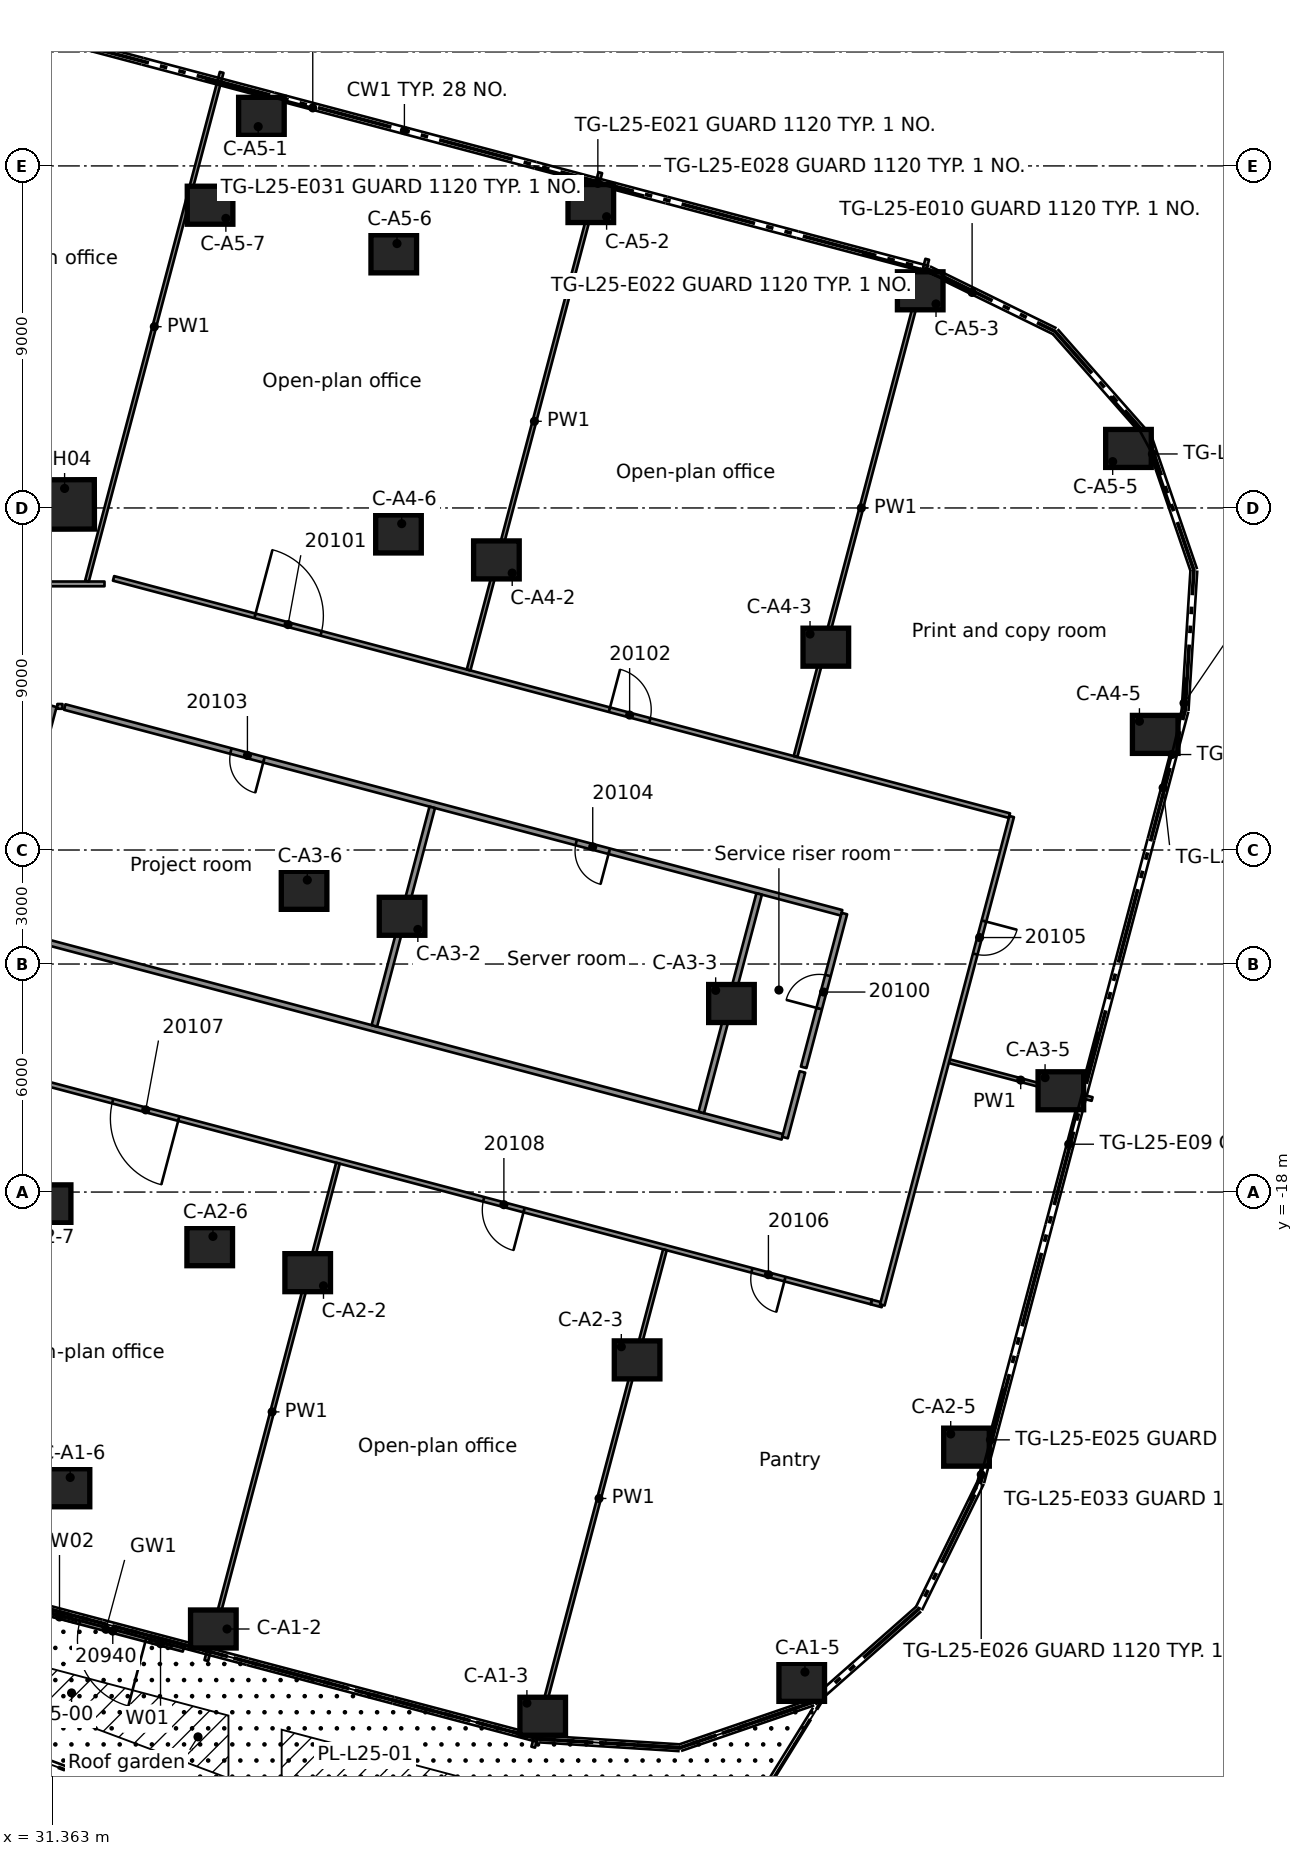
"""IFC4 building model, lengths in metres.
Left out: names, types, materials, properties, quantities, classifications, styles, units other than length and angle.
Written with IfcOpenShell. Run it as: python <this file> out.ifc"""

import sys

from ifc_helpers import new_model, si_unit, direction, frame, frame_2d, origin, origin_2d, place, context, subcontext, project, spatial, rectangle, extrude, element, fill, save


model = new_model("IFC4")
c1 = context("Model", 3, precision=1e-05, world=origin(), true_north=direction((0.0, 1.0)))
c2 = subcontext(c1, "Body", "Model", "MODEL_VIEW")
j1 = project(units=[si_unit("LENGTHUNIT", "METRE"), si_unit("PLANEANGLEUNIT", "RADIAN")], contexts=[c1])
p1 = place(None, origin())
s1 = spatial("IfcSite", under=j1, at=p1, CompositionType="ELEMENT")
p2 = place(p1, origin())
s2 = spatial("IfcBuilding", under=s1, at=p2, CompositionType="ELEMENT")
p3 = place(p2, frame((0.0, 0.0, 102.2)))
s3 = spatial("IfcBuildingStorey", under=s2, at=p3, CompositionType="ELEMENT", Elevation=102.2)
for number, where, z_axis, x_axis in (
    (1, (35.602, -29.497, 0.0), (0.0, 0.0, 1.0), (1.0, 0.0, 0.0)),
    (2, (44.269, -31.793, 0.0), (0.0, 0.0, 1.0), (1.0, 0.0, 0.0)),
    (3, (51.085, -30.901, 0.0), (0.0, 0.0, 1.0), (1.0, 0.0, 0.0)),
    (4, (31.751, -25.781, 0.0), (0.0, 0.0, 1.0), (1.0, 0.0, 0.0)),
    (5, (38.085, -20.121, 0.0), (0.0, 0.0, 1.0), (1.0, 0.0, 0.0)),
    (6, (46.753, -22.416, 0.0), (0.0, 0.0, 1.0), (1.0, 0.0, 0.0)),
    (7, (55.421, -24.712, 0.0), (0.0, 0.0, 1.0), (1.0, 0.0, 0.0)),
    (8, (35.507, -19.438, 0.0), (0.0, 0.0, 1.0), (1.0, 0.0, 0.0)),
    (9, (31.254, -18.311, 0.0), (0.0, 0.0, 1.0), (1.0, 0.0, 0.0)),
    (10, (40.568, -10.744, 0.0), (0.0, 0.0, 1.0), (1.0, 0.0, 0.0)),
    (11, (49.236, -13.039, 0.0), (0.0, 0.0, 1.0), (1.0, 0.0, 0.0)),
    (12, (57.904, -15.335, 0.0), (0.0, 0.0, 1.0), (1.0, 0.0, 0.0)),
    (13, (37.99, -10.061, 0.0), (0.0, 0.0, 1.0), (1.0, 0.0, 0.0)),
    (14, (43.051, -1.367, 0.0), (0.0, 0.0, 1.0), (1.0, 0.0, 0.0)),
    (15, (51.719, -3.663, 0.0), (0.0, 0.0, 1.0), (1.0, 0.0, 0.0)),
    (16, (60.387, -5.958, 0.0), (0.0, 0.0, 1.0), (1.0, 0.0, 0.0)),
    (17, (40.474, -0.684, 0.0), (0.0, 0.0, 1.0), (1.0, 0.0, 0.0)),
    (18, (36.867, 10.305, 0.0), (0.0, 0.0, 1.0), (1.0, 0.0, 0.0)),
    (19, (45.535, 8.01, 0.0), (0.0, 0.0, 1.0), (1.0, 0.0, 0.0)),
    (20, (54.203, 5.714, 0.0), (0.0, 0.0, 1.0), (1.0, 0.0, 0.0)),
    (21, (59.683, 1.566, 0.0), (0.0, 0.0, 1.0), (1.0, 0.0, 0.0)),
    (22, (40.35, 6.686, 0.0), (0.0, 0.0, 1.0), (1.0, 0.0, 0.0)),
    (23, (35.516, 7.966, 0.0), (0.0, 0.0, 1.0), (1.0, 0.0, 0.0)),
):
    element("IfcColumn", number, at=place(p3, frame(where, z_axis=z_axis, x_axis=x_axis)), inside=s3, PredefinedType="COLUMN", context=c2, shape_type="SweptSolid", body=[
        extrude(rectangle(XDim=1.2, YDim=1.0, at=origin_2d()), origin(), (0.0, 0.0, 1.0), 3.5),
    ])
p4 = place(p3, frame((31.822, 0.093, 0.0), z_axis=(0.0, 0.0, 1.0), x_axis=(0.999995752265, 0.002914695724, 0.0)))
e24 = element("IfcColumn", 24, at=p4, inside=s3, PredefinedType="COLUMN", context=c2, shape_type="SweptSolid", body=[
    extrude(rectangle(XDim=1.3, YDim=1.3, at=origin_2d()), origin(), (0.0, 0.0, 1.0), 3.5),
])
p5 = place(p3, frame((34.811, -30.043, 0.0), z_axis=(0.0, 0.0, 1.0), x_axis=(-0.966670614425, 0.256023286456, 0.0)))
e25 = element("IfcWall", 25, at=p5, inside=s3, PredefinedType="STANDARD", context=c2, shape_type="SweptSolid", body=[
    extrude(rectangle(XDim=4.209, YDim=0.1, at=frame_2d((2.104, 0.0))), origin(), (0.0, 0.0, 1.0), 3.1),
])
p6 = place(p5, frame((1.019, 0.0, 0.0)))
e26 = element("IfcOpeningElement", 26, at=p6, cuts=e25, PredefinedType="OPENING", context=c2, shape_type="SweptSolid", body=[
    extrude(rectangle(XDim=1.8, YDim=2.4, at=frame_2d((0.9, 1.2))), frame((0.0, 0.06, 0.0), z_axis=(0.0, -1.0, 0.0), x_axis=(1.0, 0.0, 0.0)), (0.0, 0.0, 1.0), 0.12),
])
p7 = place(p5, frame((0.319, 0.0, 0.0)))
e27 = element("IfcOpeningElement", 27, at=p7, cuts=e25, PredefinedType="OPENING", context=c2, shape_type="SweptSolid", body=[
    extrude(rectangle(XDim=0.6, YDim=2.4, at=frame_2d((0.3, 1.2))), frame((0.0, 0.06, 0.0), z_axis=(0.0, -1.0, 0.0), x_axis=(1.0, 0.0, 0.0)), (0.0, 0.0, 1.0), 0.12),
])
p8 = place(p5, frame((2.919, 0.0, 0.0)))
e28 = element("IfcOpeningElement", 28, at=p8, cuts=e25, PredefinedType="OPENING", context=c2, shape_type="SweptSolid", body=[
    extrude(rectangle(XDim=0.9, YDim=2.4, at=frame_2d((0.45, 1.2))), frame((0.0, 0.06, 0.0), z_axis=(0.0, -1.0, 0.0), x_axis=(1.0, 0.0, 0.0)), (0.0, 0.0, 1.0), 0.12),
])
p9 = place(p3, frame((52.915, -20.893, 0.0), z_axis=(0.0, 0.0, 1.0), x_axis=(0.966598588757, -0.256295080352, 0.0)))
e29 = element("IfcWall", 29, at=p9, inside=s3, PredefinedType="PARTITIONING", context=c2, shape_type="SweptSolid", body=[
    extrude(rectangle(XDim=0.3, YDim=0.125, at=frame_2d((0.15, 0.0))), origin(), (0.0, 0.0, 1.0), 3.08),
])
p10 = place(p3, frame((52.916, -20.892, 0.0), z_axis=(0.0, 0.0, 1.0), x_axis=(-0.966698340064, 0.255918579469, 0.0)))
e30 = element("IfcWall", 30, at=p10, inside=s3, PredefinedType="PARTITIONING", context=c2, shape_type="SweptSolid", body=[
    extrude(rectangle(XDim=24.759, YDim=0.125, at=frame_2d((12.379, 0.0))), origin(), (0.0, 0.0, 1.0), 3.08),
])
p11 = place(p10, frame((2.351, 0.0, 0.0)))
e31 = element("IfcOpeningElement", 31, at=p11, cuts=e30, PredefinedType="OPENING", context=c2, shape_type="SweptSolid", body=[
    extrude(rectangle(XDim=0.9, YDim=2.1, at=frame_2d((0.45, 1.05))), frame((0.0, 0.073, 0.0), z_axis=(0.0, -1.0, 0.0), x_axis=(1.0, 0.0, 0.0)), (0.0, 0.0, 1.0), 0.145),
])
p12 = place(p10, frame((18.851, 0.0, 0.0)))
e32 = element("IfcOpeningElement", 32, at=p12, cuts=e30, PredefinedType="OPENING", context=c2, shape_type="SweptSolid", body=[
    extrude(rectangle(XDim=1.8, YDim=2.1, at=frame_2d((0.9, 1.05))), frame((0.0, 0.073, 0.0), z_axis=(0.0, -1.0, 0.0), x_axis=(1.0, 0.0, 0.0)), (0.0, 0.0, 1.0), 0.145),
])
p13 = place(p10, frame((9.451, 0.0, 0.0)))
e33 = element("IfcOpeningElement", 33, at=p13, cuts=e30, PredefinedType="OPENING", context=c2, shape_type="SweptSolid", body=[
    extrude(rectangle(XDim=1.1, YDim=2.1, at=frame_2d((0.55, 1.05))), frame((0.0, 0.073, 0.0), z_axis=(0.0, -1.0, 0.0), x_axis=(1.0, 0.0, 0.0)), (0.0, 0.0, 1.0), 0.145),
])
p14 = place(p3, frame((30.016, -11.104, 0.0), z_axis=(0.0, 0.0, 1.0), x_axis=(0.966689773776, -0.255950935293, 0.0)))
e34 = element("IfcWall", 34, at=p14, inside=s3, PredefinedType="PARTITIONING", context=c2, shape_type="SweptSolid", body=[
    extrude(rectangle(XDim=21.266, YDim=0.15, at=frame_2d((10.633, 0.0))), origin(), (0.0, 0.0, 1.0), 3.08),
])
p15 = place(p3, frame((54.968, -14.557, 0.0), z_axis=(0.0, 0.0, 1.0), x_axis=(0.966683749524, -0.25597368694, 0.0)))
e35 = element("IfcWall", 35, at=p15, inside=s3, PredefinedType="PARTITIONING", context=c2, shape_type="SweptSolid", body=[
    extrude(rectangle(XDim=3.888, YDim=0.1, at=frame_2d((1.944, 0.0))), origin(), (0.0, 0.0, 1.0), 3.08),
])
p16 = place(p3, frame((52.134, -10.652, 0.0), z_axis=(0.0, 0.0, 1.0), x_axis=(-0.966671200414, 0.25602107392, 0.0)))
e36 = element("IfcWall", 36, at=p16, inside=s3, PredefinedType="PARTITIONING", context=c2, shape_type="SweptSolid", body=[
    extrude(rectangle(XDim=21.147, YDim=0.15, at=frame_2d((10.573, 0.0))), origin(), (0.0, 0.0, 1.0), 3.08),
])
p17 = place(p16, frame((15.724, 0.0, 0.0)))
e37 = element("IfcOpeningElement", 37, at=p17, cuts=e36, PredefinedType="OPENING", context=c2, shape_type="SweptSolid", body=[
    extrude(rectangle(XDim=0.9, YDim=2.1, at=frame_2d((0.45, 1.05))), frame((0.0, 0.085, 0.0), z_axis=(0.0, -1.0, 0.0), x_axis=(1.0, 0.0, 0.0)), (0.0, 0.0, 1.0), 0.17),
])
p18 = place(p16, frame((6.324, 0.0, 0.0)))
e38 = element("IfcOpeningElement", 38, at=p18, cuts=e36, PredefinedType="OPENING", context=c2, shape_type="SweptSolid", body=[
    extrude(rectangle(XDim=0.9, YDim=2.1, at=frame_2d((0.45, 1.05))), frame((0.0, 0.085, 0.0), z_axis=(0.0, -1.0, 0.0), x_axis=(1.0, 0.0, 0.0)), (0.0, 0.0, 1.0), 0.17),
])
p19 = place(p3, frame((32.976, -1.853, 0.0), z_axis=(0.0, 0.0, 1.0), x_axis=(0.966679949131, -0.255988038682, 0.0)))
e39 = element("IfcWall", 39, at=p19, inside=s3, PredefinedType="PARTITIONING", context=c2, shape_type="SweptSolid", body=[
    extrude(rectangle(XDim=24.387, YDim=0.125, at=frame_2d((12.194, 0.0))), origin(), (0.0, 0.0, 1.0), 3.08),
])
p20 = place(p19, frame((3.85, 0.0, 0.0)))
e40 = element("IfcOpeningElement", 40, at=p20, cuts=e39, PredefinedType="OPENING", context=c2, shape_type="SweptSolid", body=[
    extrude(rectangle(XDim=1.8, YDim=2.1, at=frame_2d((0.9, 1.05))), frame((0.0, 0.073, 0.0), z_axis=(0.0, -1.0, 0.0), x_axis=(1.0, 0.0, 0.0)), (0.0, 0.0, 1.0), 0.145),
])
p21 = place(p19, frame((13.499, 0.0, 0.0)))
e41 = element("IfcOpeningElement", 41, at=p21, cuts=e39, PredefinedType="OPENING", context=c2, shape_type="SweptSolid", body=[
    extrude(rectangle(XDim=1.1, YDim=2.1, at=frame_2d((0.55, 1.05))), frame((0.0, 0.073, 0.0), z_axis=(0.0, -1.0, 0.0), x_axis=(1.0, 0.0, 0.0)), (0.0, 0.0, 1.0), 0.145),
])
p22 = place(p3, frame((31.497, -5.22, 0.0), z_axis=(0.0, 0.0, 1.0), x_axis=(0.999895375943, -0.014465032563, 0.0)))
e42 = element("IfcWall", 42, at=p22, inside=s3, PredefinedType="PARTITIONING", context=c2, shape_type="SweptSolid", body=[
    extrude(rectangle(XDim=0.135, YDim=0.125, at=frame_2d((0.067, 0.0))), origin(), (0.0, 0.0, 1.0), 3.08),
])
p23 = place(p3, frame((30.819, -1.998, 0.0), z_axis=(0.0, 0.0, 1.0), x_axis=(1.0, 0.0, 0.0)))
e43 = element("IfcWall", 43, at=p23, inside=s3, PredefinedType="PARTITIONING", context=c2, shape_type="SweptSolid", body=[
    extrude(rectangle(XDim=1.919, YDim=0.125, at=frame_2d((0.959, 0.0))), origin(), (0.0, 0.0, 1.0), 3.08),
])
p24 = place(p3, frame((56.609, -8.119, 0.0), z_axis=(0.0, 0.0, 1.0), x_axis=(-0.256036919422, -0.966667003623, 0.0)))
e44 = element("IfcWall", 44, at=p24, inside=s3, PredefinedType="PARTITIONING", context=c2, shape_type="SweptSolid", body=[
    extrude(rectangle(XDim=13.294, YDim=0.125, at=frame_2d((6.647, 0.0))), origin(), (0.0, 0.0, 1.0), 3.08),
])
p25 = place(p24, frame((2.844, 0.0, 0.0)))
e45 = element("IfcOpeningElement", 45, at=p25, cuts=e44, PredefinedType="OPENING", context=c2, shape_type="SweptSolid", body=[
    extrude(rectangle(XDim=0.9, YDim=2.1, at=frame_2d((0.45, 1.05))), frame((0.0, 0.073, 0.0), z_axis=(0.0, -1.0, 0.0), x_axis=(1.0, 0.0, 0.0)), (0.0, 0.0, 1.0), 0.145),
])
p26 = place(p3, frame((50.646, -16.567, 0.0), z_axis=(0.0, 0.0, 1.0), x_axis=(0.256234173413, 0.966614736271, 0.0)))
e46 = element("IfcWall", 46, at=p26, inside=s3, PredefinedType="PARTITIONING", context=c2, shape_type="SweptSolid", body=[
    extrude(rectangle(XDim=1.787, YDim=0.15, at=frame_2d((0.894, 0.0))), origin(), (0.0, 0.0, 1.0), 3.08),
])
p27 = place(p3, frame((51.136, -14.719, 0.0), z_axis=(0.0, 0.0, 1.0), x_axis=(0.25585088256, 0.966716259247, 0.0)))
e47 = element("IfcWall", 47, at=p27, inside=s3, PredefinedType="PARTITIONING", context=c2, shape_type="SweptSolid", body=[
    extrude(rectangle(XDim=4.186, YDim=0.15, at=frame_2d((2.093, 0.0))), origin(), (0.0, 0.0, 1.0), 3.08),
])
p28 = place(p27, frame((1.6, 0.0, 0.0)))
e48 = element("IfcOpeningElement", 48, at=p28, cuts=e47, PredefinedType="OPENING", context=c2, shape_type="SweptSolid", body=[
    extrude(rectangle(XDim=0.9, YDim=2.1, at=frame_2d((0.45, 1.05))), frame((0.0, 0.085, 0.0), z_axis=(0.0, -1.0, 0.0), x_axis=(1.0, 0.0, 0.0)), (0.0, 0.0, 1.0), 0.17),
])
p29 = place(p3, frame((44.019, -32.606, 0.0), z_axis=(0.0, 0.0, 1.0), x_axis=(0.25602242295, 0.966670843124, 0.0)))
e49 = element("IfcWall", 49, at=p29, inside=s3, PredefinedType="PARTITIONING", context=c2, shape_type="SweptSolid", body=[
    extrude(rectangle(XDim=13.538, YDim=0.1, at=frame_2d((6.769, 0.0))), origin(), (0.0, 0.0, 1.0), 3.08),
])
p30 = place(p3, frame((48.442, -15.905, 0.0), z_axis=(0.0, 0.0, 1.0), x_axis=(0.256111443265, 0.96664726174, 0.0)))
e50 = element("IfcWall", 50, at=p30, inside=s3, PredefinedType="PARTITIONING", context=c2, shape_type="SweptSolid", body=[
    extrude(rectangle(XDim=5.947, YDim=0.15, at=frame_2d((2.974, 0.0))), origin(), (0.0, 0.0, 1.0), 3.08),
])
p31 = place(p3, frame((50.922, -6.542, 0.0), z_axis=(0.0, 0.0, 1.0), x_axis=(0.25602342398, 0.966670578001, 0.0)))
e51 = element("IfcWall", 51, at=p31, inside=s3, PredefinedType="PARTITIONING", context=c2, shape_type="SweptSolid", body=[
    extrude(rectangle(XDim=13.537, YDim=0.1, at=frame_2d((6.769, 0.0))), origin(), (0.0, 0.0, 1.0), 3.08),
])
p32 = place(p3, frame((35.417, -30.328, 0.0), z_axis=(0.0, 0.0, 1.0), x_axis=(0.255955015068, 0.966688693562, 0.0)))
e52 = element("IfcWall", 52, at=p32, inside=s3, PredefinedType="PARTITIONING", context=c2, shape_type="SweptSolid", body=[
    extrude(rectangle(XDim=13.538, YDim=0.1, at=frame_2d((6.769, 0.0))), origin(), (0.0, 0.0, 1.0), 3.08),
])
p33 = place(p3, frame((39.839, -13.627, 0.0), z_axis=(0.0, 0.0, 1.0), x_axis=(0.256032445662, 0.966668188557, 0.0)))
e53 = element("IfcWall", 53, at=p33, inside=s3, PredefinedType="PARTITIONING", context=c2, shape_type="SweptSolid", body=[
    extrude(rectangle(XDim=5.948, YDim=0.15, at=frame_2d((2.974, 0.0))), origin(), (0.0, 0.0, 1.0), 3.08),
])
p34 = place(p3, frame((42.319, -4.263, 0.0), z_axis=(0.0, 0.0, 1.0), x_axis=(0.255956011123, 0.966688429832, 0.0)))
e54 = element("IfcWall", 54, at=p34, inside=s3, PredefinedType="PARTITIONING", context=c2, shape_type="SweptSolid", body=[
    extrude(rectangle(XDim=13.537, YDim=0.1, at=frame_2d((6.769, 0.0))), origin(), (0.0, 0.0, 1.0), 3.08),
])
p35 = place(p3, frame((29.858, -11.053, 0.0), z_axis=(0.0, 0.0, 1.0), x_axis=(0.256179404859, 0.966629252882, 0.0)))
e55 = element("IfcWall", 55, at=p35, inside=s3, PredefinedType="PARTITIONING", context=c2, shape_type="SweptSolid", body=[
    extrude(rectangle(XDim=6.035, YDim=0.15, at=frame_2d((3.018, 0.0))), origin(), (0.0, 0.0, 1.0), 3.08),
])
p36 = place(p3, frame((32.277, -1.923, 0.0), z_axis=(0.0, 0.0, 1.0), x_axis=(0.255967683611, 0.96668533916, 0.0)))
e56 = element("IfcWall", 56, at=p36, inside=s3, PredefinedType="PARTITIONING", context=c2, shape_type="SweptSolid", body=[
    extrude(rectangle(XDim=13.845, YDim=0.1, at=frame_2d((6.923, 0.0))), origin(), (0.0, 0.0, 1.0), 3.08),
])
p37 = place(p6, origin())
e57 = element("IfcDoor", 57, at=p37, inside=s3, OperationType="DOUBLE_DOOR_SINGLE_SWING", PredefinedType="DOOR", context=c2, shape_type="SweptSolid", body=[
    extrude(rectangle(XDim=1.8, YDim=2.4, at=frame_2d((0.9, 1.2))), frame((0.0, 0.025, 0.0), z_axis=(0.0, -1.0, 0.0), x_axis=(1.0, 0.0, 0.0)), (0.0, 0.0, 1.0), 0.05),
])
fill(e26, e57)
p38 = place(p7, origin())
e58 = element("IfcWindow", 58, at=p38, inside=s3, PartitioningType="SINGLE_PANEL", PredefinedType="WINDOW", context=c2, shape_type="SweptSolid", body=[
    extrude(rectangle(XDim=0.6, YDim=2.4, at=frame_2d((0.3, 1.2))), frame((0.0, 0.03, 0.0), z_axis=(0.0, -1.0, 0.0), x_axis=(1.0, 0.0, 0.0)), (0.0, 0.0, 1.0), 0.06),
])
fill(e27, e58)
p39 = place(p8, origin())
e59 = element("IfcWindow", 59, at=p39, inside=s3, PartitioningType="SINGLE_PANEL", PredefinedType="WINDOW", context=c2, shape_type="SweptSolid", body=[
    extrude(rectangle(XDim=0.9, YDim=2.4, at=frame_2d((0.45, 1.2))), frame((0.0, 0.03, 0.0), z_axis=(0.0, -1.0, 0.0), x_axis=(1.0, 0.0, 0.0)), (0.0, 0.0, 1.0), 0.06),
])
fill(e28, e59)
p40 = place(p28, origin())
e60 = element("IfcDoor", 60, at=p40, inside=s3, OperationType="SINGLE_SWING_LEFT", PredefinedType="DOOR", context=c2, shape_type="SweptSolid", body=[
    extrude(rectangle(XDim=0.9, YDim=2.1, at=frame_2d((0.45, 1.05))), frame((0.0, 0.025, 0.0), z_axis=(0.0, -1.0, 0.0), x_axis=(1.0, 0.0, 0.0)), (0.0, 0.0, 1.0), 0.05),
])
fill(e48, e60)
p41 = place(p20, origin())
e61 = element("IfcDoor", 61, at=p41, inside=s3, OperationType="DOUBLE_DOOR_SINGLE_SWING", PredefinedType="DOOR", context=c2, shape_type="SweptSolid", body=[
    extrude(rectangle(XDim=1.8, YDim=2.1, at=frame_2d((0.9, 1.05))), frame((0.0, 0.025, 0.0), z_axis=(0.0, -1.0, 0.0), x_axis=(1.0, 0.0, 0.0)), (0.0, 0.0, 1.0), 0.05),
])
fill(e40, e61)
p42 = place(p21, origin())
e62 = element("IfcDoor", 62, at=p42, inside=s3, OperationType="SINGLE_SWING_RIGHT", PredefinedType="DOOR", context=c2, shape_type="SweptSolid", body=[
    extrude(rectangle(XDim=1.1, YDim=2.1, at=frame_2d((0.55, 1.05))), frame((0.0, 0.025, 0.0), z_axis=(0.0, -1.0, 0.0), x_axis=(1.0, 0.0, 0.0)), (0.0, 0.0, 1.0), 0.05),
])
fill(e41, e62)
p43 = place(p17, origin())
e63 = element("IfcDoor", 63, at=p43, inside=s3, OperationType="SINGLE_SWING_RIGHT", PredefinedType="DOOR", context=c2, shape_type="SweptSolid", body=[
    extrude(rectangle(XDim=0.9, YDim=2.1, at=frame_2d((0.45, 1.05))), frame((0.0, 0.025, 0.0), z_axis=(0.0, -1.0, 0.0), x_axis=(1.0, 0.0, 0.0)), (0.0, 0.0, 1.0), 0.05),
])
fill(e37, e63)
p44 = place(p18, origin())
e64 = element("IfcDoor", 64, at=p44, inside=s3, OperationType="SINGLE_SWING_LEFT", PredefinedType="DOOR", context=c2, shape_type="SweptSolid", body=[
    extrude(rectangle(XDim=0.9, YDim=2.1, at=frame_2d((0.45, 1.05))), frame((0.0, 0.025, 0.0), z_axis=(0.0, -1.0, 0.0), x_axis=(1.0, 0.0, 0.0)), (0.0, 0.0, 1.0), 0.05),
])
fill(e38, e64)
p45 = place(p25, origin())
e65 = element("IfcDoor", 65, at=p45, inside=s3, OperationType="SINGLE_SWING_LEFT", PredefinedType="DOOR", context=c2, shape_type="SweptSolid", body=[
    extrude(rectangle(XDim=0.9, YDim=2.1, at=frame_2d((0.45, 1.05))), frame((0.0, 0.025, 0.0), z_axis=(0.0, -1.0, 0.0), x_axis=(1.0, 0.0, 0.0)), (0.0, 0.0, 1.0), 0.05),
])
fill(e45, e65)
p46 = place(p11, origin())
e66 = element("IfcDoor", 66, at=p46, inside=s3, OperationType="SINGLE_SWING_LEFT", PredefinedType="DOOR", context=c2, shape_type="SweptSolid", body=[
    extrude(rectangle(XDim=0.9, YDim=2.1, at=frame_2d((0.45, 1.05))), frame((0.0, 0.025, 0.0), z_axis=(0.0, -1.0, 0.0), x_axis=(1.0, 0.0, 0.0)), (0.0, 0.0, 1.0), 0.05),
])
fill(e31, e66)
p47 = place(p12, origin())
e67 = element("IfcDoor", 67, at=p47, inside=s3, OperationType="DOUBLE_DOOR_SINGLE_SWING", PredefinedType="DOOR", context=c2, shape_type="SweptSolid", body=[
    extrude(rectangle(XDim=1.8, YDim=2.1, at=frame_2d((0.9, 1.05))), frame((0.0, 0.025, 0.0), z_axis=(0.0, -1.0, 0.0), x_axis=(1.0, 0.0, 0.0)), (0.0, 0.0, 1.0), 0.05),
])
fill(e32, e67)
p48 = place(p13, origin())
e68 = element("IfcDoor", 68, at=p48, inside=s3, OperationType="SINGLE_SWING_LEFT", PredefinedType="DOOR", context=c2, shape_type="SweptSolid", body=[
    extrude(rectangle(XDim=1.1, YDim=2.1, at=frame_2d((0.55, 1.05))), frame((0.0, 0.025, 0.0), z_axis=(0.0, -1.0, 0.0), x_axis=(1.0, 0.0, 0.0)), (0.0, 0.0, 1.0), 0.05),
])
fill(e33, e68)
save(model, sys.argv[1])
